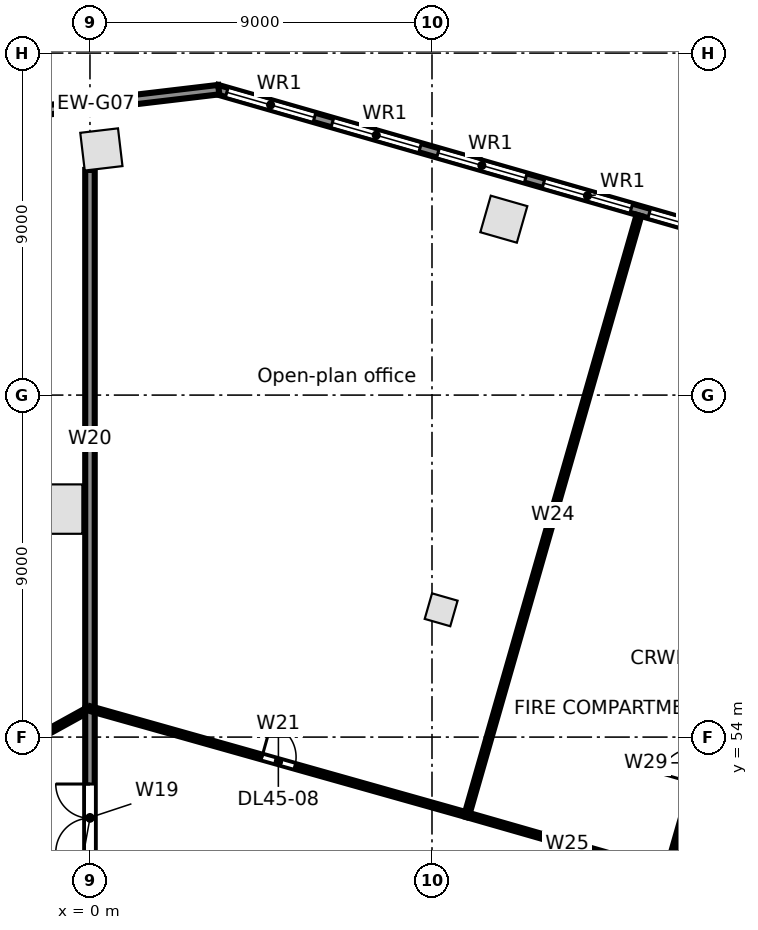
"""IFC4 building model, lengths in metres.
Left out: names, types, materials, properties, quantities, classifications, styles, units other than length and angle.
Written with IfcOpenShell. Run it as: python <this file> out.ifc"""

import sys

from ifc_helpers import new_model, si_unit, direction, frame, frame_2d, origin, origin_2d, place, context, subcontext, project, spatial, rectangle, extrude, element, fill, save


model = new_model("IFC4")
c1 = context("Model", 3, precision=1e-05, world=origin(), true_north=direction((0.0, 1.0)))
c2 = subcontext(c1, "Body", "Model", "MODEL_VIEW")
j1 = project(units=[si_unit("LENGTHUNIT", "METRE"), si_unit("PLANEANGLEUNIT", "RADIAN")], contexts=[c1])
p1 = place(None, origin())
s1 = spatial("IfcSite", under=j1, at=p1, CompositionType="ELEMENT")
p2 = place(p1, origin())
s2 = spatial("IfcBuilding", under=s1, at=p2, CompositionType="ELEMENT")
p3 = place(p2, frame((0.0, 0.0, 207.5)))
s3 = spatial("IfcBuildingStorey", under=s2, at=p3, CompositionType="ELEMENT", Elevation=207.5)
for number, where, z_axis, x_axis in (
    (1, (10.89, 67.629, 0.0), (0.0, 0.0, 1.0), (-0.961, 0.276, 0.0)),
    (2, (0.3, 69.464, 0.0), (0.0, 0.0, 1.0), (-0.993, -0.118, 0.0)),
):
    element("IfcColumn", number, at=place(p3, frame(where, z_axis=z_axis, x_axis=x_axis)), inside=s3, PredefinedType="COLUMN", context=c2, shape_type="SweptSolid", body=[
        extrude(rectangle(XDim=1.0, YDim=1.0, at=origin_2d()), origin(), (0.0, 0.0, 1.0), 3.9),
    ])
p4 = place(p3, frame((-0.85, 60.0, 0.0), z_axis=(0.0, 0.0, 1.0), x_axis=(0.0, 1.0, 0.0)))
e3 = element("IfcColumn", 3, at=p4, inside=s3, PredefinedType="COLUMN", context=c2, shape_type="SweptSolid", body=[
    extrude(rectangle(XDim=1.3, YDim=1.3, at=origin_2d()), origin(), (0.0, 0.0, 1.0), 3.9),
])
p5 = place(p3, frame((9.241, 57.35, 0.0), z_axis=(0.0, 0.0, 1.0), x_axis=(0.961261695938, -0.275637355817, 0.0)))
e4 = element("IfcColumn", 4, at=p5, inside=s3, PredefinedType="COLUMN", context=c2, shape_type="SweptSolid", body=[
    extrude(rectangle(XDim=0.7, YDim=0.7, at=origin_2d()), origin(), (0.0, 0.0, 1.0), 3.9),
])
p6 = place(p3, frame((3.34, 71.042, 0.0), z_axis=(0.0, 0.0, 1.0), x_axis=(0.96126179431, -0.275637012753, 0.0)))
e5 = element("IfcWall", 5, at=p6, inside=s3, PredefinedType="STANDARD", context=c2, shape_type="SweptSolid", body=[
    extrude(rectangle(XDim=34.779, YDim=0.25, at=frame_2d((17.39, 0.0))), origin(), (0.0, 0.0, 1.0), 3.62),
])
p7 = place(p6, frame((32.071, 0.0, 0.8)))
e6 = element("IfcOpeningElement", 6, at=p7, cuts=e5, PredefinedType="OPENING", context=c2, shape_type="SweptSolid", body=[
    extrude(rectangle(XDim=2.4, YDim=2.2, at=frame_2d((1.2, 1.1))), frame((0.0, 0.135, 0.0), z_axis=(0.0, -1.0, 0.0), x_axis=(1.0, 0.0, 0.0)), (0.0, 0.0, 1.0), 0.27),
])
p8 = place(p6, frame((29.18, 0.0, 0.8)))
e7 = element("IfcOpeningElement", 7, at=p8, cuts=e5, PredefinedType="OPENING", context=c2, shape_type="SweptSolid", body=[
    extrude(rectangle(XDim=2.4, YDim=2.2, at=frame_2d((1.2, 1.1))), frame((0.0, 0.135, 0.0), z_axis=(0.0, -1.0, 0.0), x_axis=(1.0, 0.0, 0.0)), (0.0, 0.0, 1.0), 0.27),
])
p9 = place(p6, frame((26.289, 0.0, 0.8)))
e8 = element("IfcOpeningElement", 8, at=p9, cuts=e5, PredefinedType="OPENING", context=c2, shape_type="SweptSolid", body=[
    extrude(rectangle(XDim=2.4, YDim=2.2, at=frame_2d((1.2, 1.1))), frame((0.0, 0.135, 0.0), z_axis=(0.0, -1.0, 0.0), x_axis=(1.0, 0.0, 0.0)), (0.0, 0.0, 1.0), 0.27),
])
p10 = place(p6, frame((23.398, 0.0, 0.8)))
e9 = element("IfcOpeningElement", 9, at=p10, cuts=e5, PredefinedType="OPENING", context=c2, shape_type="SweptSolid", body=[
    extrude(rectangle(XDim=2.4, YDim=2.2, at=frame_2d((1.2, 1.1))), frame((0.0, 0.135, 0.0), z_axis=(0.0, -1.0, 0.0), x_axis=(1.0, 0.0, 0.0)), (0.0, 0.0, 1.0), 0.27),
])
p11 = place(p6, frame((20.508, 0.0, 0.8)))
e10 = element("IfcOpeningElement", 10, at=p11, cuts=e5, PredefinedType="OPENING", context=c2, shape_type="SweptSolid", body=[
    extrude(rectangle(XDim=2.4, YDim=2.2, at=frame_2d((1.2, 1.1))), frame((0.0, 0.135, 0.0), z_axis=(0.0, -1.0, 0.0), x_axis=(1.0, 0.0, 0.0)), (0.0, 0.0, 1.0), 0.27),
])
p12 = place(p6, frame((17.616, 0.0, 0.8)))
e11 = element("IfcOpeningElement", 11, at=p12, cuts=e5, PredefinedType="OPENING", context=c2, shape_type="SweptSolid", body=[
    extrude(rectangle(XDim=2.4, YDim=2.2, at=frame_2d((1.2, 1.1))), frame((0.0, 0.135, 0.0), z_axis=(0.0, -1.0, 0.0), x_axis=(1.0, 0.0, 0.0)), (0.0, 0.0, 1.0), 0.27),
])
p13 = place(p6, frame((14.726, 0.0, 0.8)))
e12 = element("IfcOpeningElement", 12, at=p13, cuts=e5, PredefinedType="OPENING", context=c2, shape_type="SweptSolid", body=[
    extrude(rectangle(XDim=2.4, YDim=2.2, at=frame_2d((1.2, 1.1))), frame((0.0, 0.135, 0.0), z_axis=(0.0, -1.0, 0.0), x_axis=(1.0, 0.0, 0.0)), (0.0, 0.0, 1.0), 0.27),
])
p14 = place(p6, frame((11.834, 0.0, 0.8)))
e13 = element("IfcOpeningElement", 13, at=p14, cuts=e5, PredefinedType="OPENING", context=c2, shape_type="SweptSolid", body=[
    extrude(rectangle(XDim=2.4, YDim=2.2, at=frame_2d((1.2, 1.1))), frame((0.0, 0.135, 0.0), z_axis=(0.0, -1.0, 0.0), x_axis=(1.0, 0.0, 0.0)), (0.0, 0.0, 1.0), 0.27),
])
p15 = place(p6, frame((8.944, 0.0, 0.8)))
e14 = element("IfcOpeningElement", 14, at=p15, cuts=e5, PredefinedType="OPENING", context=c2, shape_type="SweptSolid", body=[
    extrude(rectangle(XDim=2.4, YDim=2.2, at=frame_2d((1.2, 1.1))), frame((0.0, 0.135, 0.0), z_axis=(0.0, -1.0, 0.0), x_axis=(1.0, 0.0, 0.0)), (0.0, 0.0, 1.0), 0.27),
])
p16 = place(p6, frame((6.052, 0.0, 0.8)))
e15 = element("IfcOpeningElement", 15, at=p16, cuts=e5, PredefinedType="OPENING", context=c2, shape_type="SweptSolid", body=[
    extrude(rectangle(XDim=2.4, YDim=2.2, at=frame_2d((1.2, 1.1))), frame((0.0, 0.135, 0.0), z_axis=(0.0, -1.0, 0.0), x_axis=(1.0, 0.0, 0.0)), (0.0, 0.0, 1.0), 0.27),
])
p17 = place(p6, frame((3.162, 0.0, 0.8)))
e16 = element("IfcOpeningElement", 16, at=p17, cuts=e5, PredefinedType="OPENING", context=c2, shape_type="SweptSolid", body=[
    extrude(rectangle(XDim=2.4, YDim=2.2, at=frame_2d((1.2, 1.1))), frame((0.0, 0.135, 0.0), z_axis=(0.0, -1.0, 0.0), x_axis=(1.0, 0.0, 0.0)), (0.0, 0.0, 1.0), 0.27),
])
p18 = place(p6, frame((0.271, 0.0, 0.8)))
e17 = element("IfcOpeningElement", 17, at=p18, cuts=e5, PredefinedType="OPENING", context=c2, shape_type="SweptSolid", body=[
    extrude(rectangle(XDim=2.4, YDim=2.2, at=frame_2d((1.2, 1.1))), frame((0.0, 0.135, 0.0), z_axis=(0.0, -1.0, 0.0), x_axis=(1.0, 0.0, 0.0)), (0.0, 0.0, 1.0), 0.27),
])
p19 = place(p3, frame((-3.071, 70.273, 0.0), z_axis=(0.0, 0.0, 1.0), x_axis=(0.993064524962, 0.11757061394, 0.0)))
e18 = element("IfcWall", 18, at=p19, inside=s3, PredefinedType="STANDARD", context=c2, shape_type="SweptSolid", body=[
    extrude(rectangle(XDim=6.506, YDim=0.25, at=frame_2d((3.253, 0.0))), origin(), (0.0, 0.0, 1.0), 3.62),
])
p20 = place(p3, frame((-6.053, 51.405, 0.0), z_axis=(0.0, 0.0, 1.0), x_axis=(0.875247434681, 0.483675436718, 0.0)))
e19 = element("IfcWall", 19, at=p20, inside=s3, PredefinedType="PARTITIONING", context=c2, shape_type="SweptSolid", body=[
    extrude(rectangle(XDim=6.916, YDim=0.125, at=frame_2d((3.458, 0.0))), origin(), (0.0, 0.0, 1.0), 2.8),
])
p21 = place(p20, frame((2.95, 0.0, 0.0)))
e20 = element("IfcOpeningElement", 20, at=p21, cuts=e19, PredefinedType="OPENING", context=c2, shape_type="SweptSolid", body=[
    extrude(rectangle(XDim=0.9, YDim=2.1, at=frame_2d((0.45, 1.05))), frame((0.0, 0.073, 0.0), z_axis=(0.0, -1.0, 0.0), x_axis=(1.0, 0.0, 0.0)), (0.0, 0.0, 1.0), 0.145),
])
p22 = place(p3, frame((0.0, 49.015, 0.0), z_axis=(0.0, 0.0, 1.0), x_axis=(0.0, 1.0, 0.0)))
e21 = element("IfcWall", 21, at=p22, inside=s3, PredefinedType="PARTITIONING", context=c2, shape_type="SweptSolid", body=[
    extrude(rectangle(XDim=5.735, YDim=0.25, at=frame_2d((2.868, 0.0))), origin(), (0.0, 0.0, 1.0), 3.62),
])
p23 = place(p22, frame((1.95, 0.0, 0.0)))
e22 = element("IfcOpeningElement", 22, at=p23, cuts=e21, PredefinedType="OPENING", context=c2, shape_type="SweptSolid", body=[
    extrude(rectangle(XDim=1.8, YDim=2.1, at=frame_2d((0.9, 1.05))), frame((0.0, 0.135, 0.0), z_axis=(0.0, -1.0, 0.0), x_axis=(1.0, 0.0, 0.0)), (0.0, 0.0, 1.0), 0.27),
])
p24 = place(p3, frame((0.0, 54.75, 0.0), z_axis=(0.0, 0.0, 1.0), x_axis=(0.0, 1.0, 0.0)))
e23 = element("IfcWall", 23, at=p24, inside=s3, PredefinedType="PARTITIONING", context=c2, shape_type="SweptSolid", body=[
    extrude(rectangle(XDim=14.175, YDim=0.25, at=frame_2d((7.087, 0.0))), origin(), (0.0, 0.0, 1.0), 2.8),
])
p25 = place(p3, frame((0.0, 54.75, 0.0), z_axis=(0.0, 0.0, 1.0), x_axis=(0.962504897093, -0.271264304823, 0.0)))
e24 = element("IfcWall", 24, at=p25, inside=s3, PredefinedType="PARTITIONING", context=c2, shape_type="SweptSolid", body=[
    extrude(rectangle(XDim=10.303, YDim=0.125, at=frame_2d((5.152, 0.0))), origin(), (0.0, 0.0, 1.0), 2.9),
])
p26 = place(p25, frame((4.7, 0.0, 0.0)))
e25 = element("IfcOpeningElement", 25, at=p26, cuts=e24, PredefinedType="OPENING", context=c2, shape_type="SweptSolid", body=[
    extrude(rectangle(XDim=0.9, YDim=2.1, at=frame_2d((0.45, 1.05))), frame((0.0, 0.073, 0.0), z_axis=(0.0, -1.0, 0.0), x_axis=(1.0, 0.0, 0.0)), (0.0, 0.0, 1.0), 0.145),
])
p27 = place(p3, frame((9.917, 51.955, 0.0), z_axis=(0.0, 0.0, 1.0), x_axis=(0.275933286704, 0.96117678982, 0.0)))
e26 = element("IfcWall", 26, at=p27, inside=s3, PredefinedType="PARTITIONING", context=c2, shape_type="SweptSolid", body=[
    extrude(rectangle(XDim=16.41, YDim=0.125, at=frame_2d((8.205, 0.0))), origin(), (0.0, 0.0, 1.0), 2.792),
])
p28 = place(p3, frame((9.917, 51.955, 0.0), z_axis=(0.0, 0.0, 1.0), x_axis=(0.961258850611, -0.275647278458, 0.0)))
e27 = element("IfcWall", 27, at=p28, inside=s3, PredefinedType="PARTITIONING", context=c2, shape_type="SweptSolid", body=[
    extrude(rectangle(XDim=5.5, YDim=0.125, at=frame_2d((2.75, 0.0))), origin(), (0.0, 0.0, 1.0), 2.8),
])
p29 = place(p3, frame((15.204, 50.439, 0.0), z_axis=(0.0, 0.0, 1.0), x_axis=(0.275505760599, 0.961299420512, 0.0)))
e28 = element("IfcWall", 28, at=p29, inside=s3, PredefinedType="PARTITIONING", context=c2, shape_type="SweptSolid", body=[
    extrude(rectangle(XDim=5.999, YDim=0.125, at=frame_2d((3.0, 0.0))), origin(), (0.0, 0.0, 1.0), 2.8),
])
p30 = place(p29, frame((2.45, 0.0, 0.0)))
e29 = element("IfcOpeningElement", 29, at=p30, cuts=e28, PredefinedType="OPENING", context=c2, shape_type="SweptSolid", body=[
    extrude(rectangle(XDim=0.9, YDim=2.1, at=frame_2d((0.45, 1.05))), frame((0.0, 0.073, 0.0), z_axis=(0.0, -1.0, 0.0), x_axis=(1.0, 0.0, 0.0)), (0.0, 0.0, 1.0), 0.145),
])
p31 = place(p14, origin())
e30 = element("IfcWindow", 30, at=p31, inside=s3, PartitioningType="SINGLE_PANEL", PredefinedType="WINDOW", context=c2, shape_type="SweptSolid", body=[
    extrude(rectangle(XDim=2.4, YDim=2.2, at=frame_2d((1.2, 1.1))), frame((0.0, 0.03, 0.0), z_axis=(0.0, -1.0, 0.0), x_axis=(1.0, 0.0, 0.0)), (0.0, 0.0, 1.0), 0.06),
])
fill(e13, e30)
p32 = place(p15, origin())
e31 = element("IfcWindow", 31, at=p32, inside=s3, PartitioningType="SINGLE_PANEL", PredefinedType="WINDOW", context=c2, shape_type="SweptSolid", body=[
    extrude(rectangle(XDim=2.4, YDim=2.2, at=frame_2d((1.2, 1.1))), frame((0.0, 0.03, 0.0), z_axis=(0.0, -1.0, 0.0), x_axis=(1.0, 0.0, 0.0)), (0.0, 0.0, 1.0), 0.06),
])
fill(e14, e31)
p33 = place(p16, origin())
e32 = element("IfcWindow", 32, at=p33, inside=s3, PartitioningType="SINGLE_PANEL", PredefinedType="WINDOW", context=c2, shape_type="SweptSolid", body=[
    extrude(rectangle(XDim=2.4, YDim=2.2, at=frame_2d((1.2, 1.1))), frame((0.0, 0.03, 0.0), z_axis=(0.0, -1.0, 0.0), x_axis=(1.0, 0.0, 0.0)), (0.0, 0.0, 1.0), 0.06),
])
fill(e15, e32)
p34 = place(p17, origin())
e33 = element("IfcWindow", 33, at=p34, inside=s3, PartitioningType="SINGLE_PANEL", PredefinedType="WINDOW", context=c2, shape_type="SweptSolid", body=[
    extrude(rectangle(XDim=2.4, YDim=2.2, at=frame_2d((1.2, 1.1))), frame((0.0, 0.03, 0.0), z_axis=(0.0, -1.0, 0.0), x_axis=(1.0, 0.0, 0.0)), (0.0, 0.0, 1.0), 0.06),
])
fill(e16, e33)
p35 = place(p18, origin())
e34 = element("IfcWindow", 34, at=p35, inside=s3, PartitioningType="SINGLE_PANEL", PredefinedType="WINDOW", context=c2, shape_type="SweptSolid", body=[
    extrude(rectangle(XDim=2.4, YDim=2.2, at=frame_2d((1.2, 1.1))), frame((0.0, 0.03, 0.0), z_axis=(0.0, -1.0, 0.0), x_axis=(1.0, 0.0, 0.0)), (0.0, 0.0, 1.0), 0.06),
])
fill(e17, e34)
p36 = place(p26, origin())
e35 = element("IfcDoor", 35, at=p36, inside=s3, OperationType="SINGLE_SWING_LEFT", PredefinedType="DOOR", context=c2, shape_type="SweptSolid", body=[
    extrude(rectangle(XDim=0.9, YDim=2.1, at=frame_2d((0.45, 1.05))), frame((0.0, 0.025, 0.0), z_axis=(0.0, -1.0, 0.0), x_axis=(1.0, 0.0, 0.0)), (0.0, 0.0, 1.0), 0.05),
])
fill(e25, e35)
p37 = place(p23, origin())
e36 = element("IfcDoor", 36, at=p37, inside=s3, OperationType="DOUBLE_DOOR_SINGLE_SWING", PredefinedType="DOOR", context=c2, shape_type="SweptSolid", body=[
    extrude(rectangle(XDim=1.8, YDim=2.1, at=frame_2d((0.9, 1.05))), frame((0.0, 0.025, 0.0), z_axis=(0.0, -1.0, 0.0), x_axis=(1.0, 0.0, 0.0)), (0.0, 0.0, 1.0), 0.05),
])
fill(e22, e36)
save(model, sys.argv[1])
